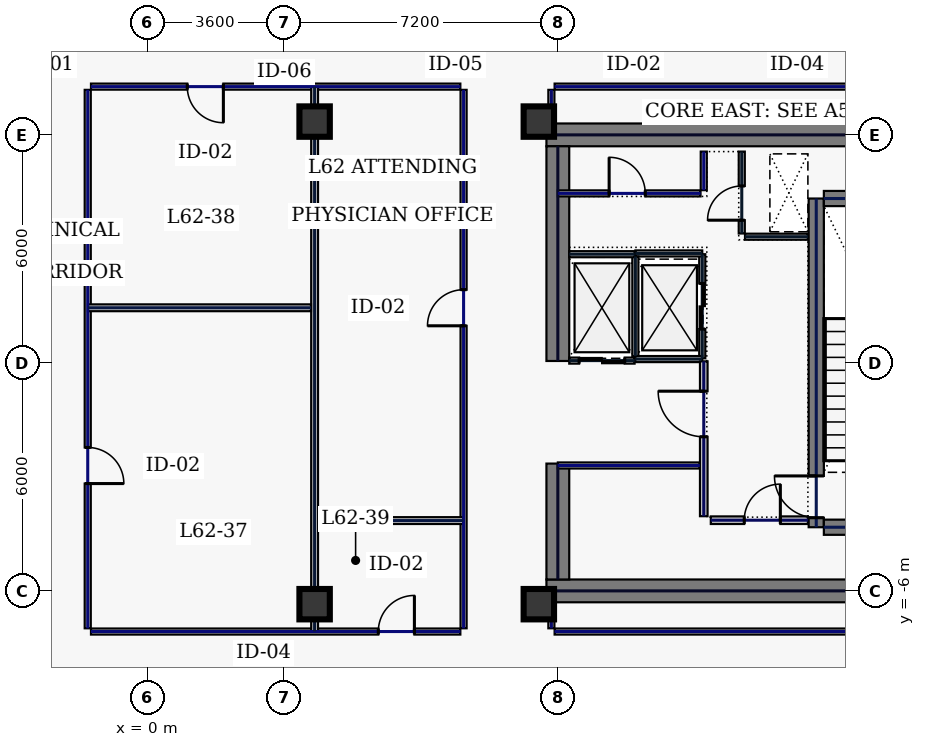
"""IFC4 building model, lengths in metres.
Left out: names, types, materials, properties, quantities, classifications, styles, units other than length and angle.
Written with IfcOpenShell. Run it as: python <this file> out.ifc"""

import sys

from ifc_helpers import new_model, si_unit, direction, frame, frame_2d, origin, origin_2d, place, context, subcontext, project, spatial, rectangle, hollow_rectangle, extrude, element, fill, save


model = new_model("IFC4")
c1 = context("Model", 3, precision=1e-05, world=origin(), true_north=direction((0.0, 1.0)))
c2 = subcontext(c1, "Body", "Model", "MODEL_VIEW")
j1 = project(units=[si_unit("LENGTHUNIT", "METRE"), si_unit("PLANEANGLEUNIT", "RADIAN")], contexts=[c1])
p1 = place(None, origin())
s1 = spatial("IfcSite", under=j1, at=p1, CompositionType="ELEMENT")
p2 = place(p1, origin())
s2 = spatial("IfcBuilding", under=s1, at=p2, CompositionType="ELEMENT")
p3 = place(p2, frame((0.0, 0.0, 267.0)))
s3 = spatial("IfcBuildingStorey", under=s2, at=p3, CompositionType="ELEMENT", Elevation=267.0)
for number, where, z_axis, x_axis in (
    (1, (10.5, 6.0, 0.0), (0.0, 0.0, 1.0), (1.0, 0.0, 0.0)),
    (2, (10.5, -6.0, 0.0), (0.0, 0.0, 1.0), (1.0, 0.0, 0.0)),
):
    element("IfcWall", number, at=place(p3, frame(where, z_axis=z_axis, x_axis=x_axis)), inside=s3, PredefinedType="SHEAR", context=c2, shape_type="SweptSolid", body=[
        extrude(rectangle(XDim=11.5, YDim=0.6, at=frame_2d((5.75, 0.0))), origin(), (0.0, 0.0, 1.0), 3.68),
    ])
p4 = place(p3, frame((10.8, -5.7, 0.0), z_axis=(0.0, 0.0, 1.0), x_axis=(0.0, 1.0, 0.0)))
e3 = element("IfcWall", 3, at=p4, inside=s3, PredefinedType="SHEAR", context=c2, shape_type="SweptSolid", body=[
    extrude(rectangle(XDim=3.05, YDim=0.6, at=frame_2d((1.525, 0.0))), origin(), (0.0, 0.0, 1.0), 3.68),
])
p5 = place(p3, frame((10.8, 0.05, 0.0), z_axis=(0.0, 0.0, 1.0), x_axis=(0.0, 1.0, 0.0)))
e4 = element("IfcWall", 4, at=p5, inside=s3, PredefinedType="SHEAR", context=c2, shape_type="SweptSolid", body=[
    extrude(rectangle(XDim=5.65, YDim=0.6, at=frame_2d((2.825, 0.0))), origin(), (0.0, 0.0, 1.0), 3.68),
])
p6 = place(p3, frame((17.6, -4.325, 0.0), z_axis=(0.0, 0.0, 1.0), x_axis=(0.0, 1.0, 0.0)))
e5 = element("IfcWall", 5, at=p6, inside=s3, PredefinedType="SHEAR", context=c2, shape_type="SweptSolid", body=[
    extrude(rectangle(XDim=8.65, YDim=0.4, at=frame_2d((4.325, 0.0))), origin(), (0.0, 0.0, 1.0), 3.68),
])
p7 = place(p6, frame((0.25, 0.0, 0.0)))
e6 = element("IfcOpeningElement", 6, at=p7, cuts=e5, PredefinedType="OPENING", context=c2, shape_type="SweptSolid", body=[
    extrude(rectangle(XDim=1.1, YDim=2.2, at=frame_2d((0.55, 1.1))), frame((0.0, 0.21, 0.0), z_axis=(0.0, -1.0, 0.0), x_axis=(1.0, 0.0, 0.0)), (0.0, 0.0, 1.0), 0.42),
])
for number, where, z_axis, x_axis in (
    (7, (17.8, -4.325, 0.0), (0.0, 0.0, 1.0), (1.0, 0.0, 0.0)),
    (8, (17.8, 4.325, 0.0), (0.0, 0.0, 1.0), (1.0, 0.0, 0.0)),
):
    element("IfcWall", number, at=place(p3, frame(where, z_axis=z_axis, x_axis=x_axis)), inside=s3, PredefinedType="SHEAR", context=c2, shape_type="SweptSolid", body=[
        extrude(rectangle(XDim=3.4, YDim=0.4, at=frame_2d((1.7, 0.0))), origin(), (0.0, 0.0, 1.0), 3.68),
    ])
for number, where, z_axis, x_axis in (
    (9, (10.3, -6.35, 0.0), (0.0, 0.0, 1.0), (1.0, 0.0, 0.0)),
    (10, (10.3, 6.35, 0.0), (0.0, 0.0, 1.0), (1.0, 0.0, 0.0)),
    (11, (4.4, -6.35, 0.0), (0.0, 0.0, 1.0), (1.0, 0.0, 0.0)),
    (12, (4.4, 6.35, 0.0), (0.0, 0.0, 1.0), (1.0, 0.0, 0.0)),
):
    element("IfcColumn", number, at=place(p3, frame(where, z_axis=z_axis, x_axis=x_axis)), inside=s3, PredefinedType="COLUMN", context=c2, shape_type="SweptSolid", body=[
        extrude(hollow_rectangle(XDim=0.8, YDim=0.8, WallThickness=0.036, at=origin_2d()), origin(), (0.0, 0.0, 1.0), 3.68),
    ])
p8 = place(p3, frame((14.6, 0.12, 0.0), z_axis=(0.0, 0.0, 1.0), x_axis=(0.0, 1.0, 0.0)))
e13 = element("IfcWall", 13, at=p8, inside=s3, PredefinedType="PARTITIONING", context=c2, shape_type="SweptSolid", body=[
    extrude(rectangle(XDim=2.74, YDim=0.16, at=frame_2d((1.37, 0.0))), origin(), (0.0, 0.0, 1.0), 3.68),
])
p9 = place(p8, frame((0.77, 0.0, 0.0)))
e14 = element("IfcOpeningElement", 14, at=p9, cuts=e13, PredefinedType="OPENING", context=c2, shape_type="SweptSolid", body=[
    extrude(rectangle(XDim=1.2, YDim=2.2, at=frame_2d((0.6, 1.1))), frame((0.0, 0.09, 0.0), z_axis=(0.0, -1.0, 0.0), x_axis=(1.0, 0.0, 0.0)), (0.0, 0.0, 1.0), 0.18),
])
for number, where, z_axis, x_axis in (
    (15, (12.84, 0.1, 0.0), (0.0, 0.0, 1.0), (1.0, 0.0, 0.0)),
    (16, (12.84, 2.88, 0.0), (0.0, 0.0, 1.0), (1.0, 0.0, 0.0)),
):
    element("IfcWall", number, at=place(p3, frame(where, z_axis=z_axis, x_axis=x_axis)), inside=s3, PredefinedType="PARTITIONING", context=c2, shape_type="SweptSolid", body=[
        extrude(rectangle(XDim=1.76, YDim=0.16, at=frame_2d((0.88, 0.0))), origin(), (0.0, 0.0, 1.0), 3.68),
    ])
p10 = place(p3, frame((12.84, 0.18, 0.0), z_axis=(0.0, 0.0, 1.0), x_axis=(0.0, 1.0, 0.0)))
e17 = element("IfcWall", 17, at=p10, inside=s3, PredefinedType="PARTITIONING", context=c2, shape_type="SweptSolid", body=[
    extrude(rectangle(XDim=2.62, YDim=0.16, at=frame_2d((1.31, 0.0))), origin(), (0.0, 0.0, 1.0), 3.68),
])
p11 = place(p3, frame((11.1, 0.06, 0.0), z_axis=(0.0, 0.0, 1.0), x_axis=(1.0, 0.0, 0.0)))
e18 = element("IfcWall", 18, at=p11, inside=s3, PredefinedType="PARTITIONING", context=c2, shape_type="SweptSolid", body=[
    extrude(rectangle(XDim=1.72, YDim=0.16, at=frame_2d((0.86, 0.0))), origin(), (0.0, 0.0, 1.0), 3.68),
])
p12 = place(p11, frame((0.26, 0.0, 0.0)))
e19 = element("IfcOpeningElement", 19, at=p12, cuts=e18, PredefinedType="OPENING", context=c2, shape_type="SweptSolid", body=[
    extrude(rectangle(XDim=1.2, YDim=2.2, at=frame_2d((0.6, 1.1))), frame((0.0, 0.09, 0.0), z_axis=(0.0, -1.0, 0.0), x_axis=(1.0, 0.0, 0.0)), (0.0, 0.0, 1.0), 0.18),
])
p13 = place(p3, frame((11.1, 2.86, 0.0), z_axis=(0.0, 0.0, 1.0), x_axis=(1.0, 0.0, 0.0)))
e20 = element("IfcWall", 20, at=p13, inside=s3, PredefinedType="PARTITIONING", context=c2, shape_type="SweptSolid", body=[
    extrude(rectangle(XDim=1.72, YDim=0.16, at=frame_2d((0.86, 0.0))), origin(), (0.0, 0.0, 1.0), 3.68),
])
p14 = place(p3, frame((15.64, 3.405, 0.0), z_axis=(0.0, 0.0, 1.0), x_axis=(0.0, 1.0, 0.0)))
e21 = element("IfcWall", 21, at=p14, inside=s3, PredefinedType="PARTITIONING", context=c2, shape_type="SweptSolid", body=[
    extrude(rectangle(XDim=2.155, YDim=0.16, at=frame_2d((1.078, 0.0))), origin(), (0.0, 0.0, 1.0), 3.68),
])
p15 = place(p14, frame((0.35, 0.0, 0.0)))
e22 = element("IfcOpeningElement", 22, at=p15, cuts=e21, PredefinedType="OPENING", context=c2, shape_type="SweptSolid", body=[
    extrude(rectangle(XDim=0.9, YDim=2.2, at=frame_2d((0.45, 1.1))), frame((0.0, 0.09, 0.0), z_axis=(0.0, -1.0, 0.0), x_axis=(1.0, 0.0, 0.0)), (0.0, 0.0, 1.0), 0.18),
])
p16 = place(p3, frame((15.725, 3.32, 0.0), z_axis=(0.0, 0.0, 1.0), x_axis=(1.0, 0.0, 0.0)))
e23 = element("IfcWall", 23, at=p16, inside=s3, PredefinedType="PARTITIONING", context=c2, shape_type="SweptSolid", body=[
    extrude(rectangle(XDim=1.655, YDim=0.16, at=frame_2d((0.827, 0.0))), origin(), (0.0, 0.0, 1.0), 3.68),
])
p17 = place(p3, frame((14.825, -4.14, 0.0), z_axis=(0.0, 0.0, 1.0), x_axis=(1.0, 0.0, 0.0)))
e24 = element("IfcWall", 24, at=p17, inside=s3, PredefinedType="SOLIDWALL", context=c2, shape_type="SweptSolid", body=[
    extrude(rectangle(XDim=2.555, YDim=0.2, at=frame_2d((1.277, 0.0))), origin(), (0.0, 0.0, 1.0), 3.68),
])
p18 = place(p17, frame((0.88, 0.0, 0.0)))
e25 = element("IfcOpeningElement", 25, at=p18, cuts=e24, PredefinedType="OPENING", context=c2, shape_type="SweptSolid", body=[
    extrude(rectangle(XDim=0.95, YDim=2.2, at=frame_2d((0.475, 1.1))), frame((0.0, 0.11, 0.0), z_axis=(0.0, -1.0, 0.0), x_axis=(1.0, 0.0, 0.0)), (0.0, 0.0, 1.0), 0.22),
])
p19 = place(p3, frame((10.8, -2.7, 0.0), z_axis=(0.0, 0.0, 1.0), x_axis=(1.0, 0.0, 0.0)))
e26 = element("IfcWall", 26, at=p19, inside=s3, PredefinedType="PARTITIONING", context=c2, shape_type="SweptSolid", body=[
    extrude(rectangle(XDim=3.735, YDim=0.16, at=frame_2d((1.867, 0.0))), origin(), (0.0, 0.0, 1.0), 3.68),
])
p20 = place(p3, frame((10.8, 4.46, 0.0), z_axis=(0.0, 0.0, 1.0), x_axis=(1.0, 0.0, 0.0)))
e27 = element("IfcWall", 27, at=p20, inside=s3, PredefinedType="PARTITIONING", context=c2, shape_type="SweptSolid", body=[
    extrude(rectangle(XDim=3.755, YDim=0.16, at=frame_2d((1.877, 0.0))), origin(), (0.0, 0.0, 1.0), 3.68),
])
p21 = place(p20, frame((1.35, 0.0, 0.0)))
e28 = element("IfcOpeningElement", 28, at=p21, cuts=e27, PredefinedType="OPENING", context=c2, shape_type="SweptSolid", body=[
    extrude(rectangle(XDim=0.95, YDim=2.2, at=frame_2d((0.475, 1.1))), frame((0.0, 0.09, 0.0), z_axis=(0.0, -1.0, 0.0), x_axis=(1.0, 0.0, 0.0)), (0.0, 0.0, 1.0), 0.18),
])
p22 = place(p3, frame((14.64, 4.545, 0.0), z_axis=(0.0, 0.0, 1.0), x_axis=(0.0, 1.0, 0.0)))
e29 = element("IfcWall", 29, at=p22, inside=s3, PredefinedType="PARTITIONING", context=c2, shape_type="SweptSolid", body=[
    extrude(rectangle(XDim=1.015, YDim=0.16, at=frame_2d((0.508, 0.0))), origin(), (0.0, 0.0, 1.0), 3.68),
])
p23 = place(p3, frame((14.64, -4.035, 0.0), z_axis=(0.0, 0.0, 1.0), x_axis=(0.0, 1.0, 0.0)))
e30 = element("IfcWall", 30, at=p23, inside=s3, PredefinedType="SOLIDWALL", context=c2, shape_type="SweptSolid", body=[
    extrude(rectangle(XDim=4.075, YDim=0.2, at=frame_2d((2.038, 0.0))), origin(), (0.0, 0.0, 1.0), 3.68),
])
p24 = place(p23, frame((2.09, 0.0, 0.0)))
e31 = element("IfcOpeningElement", 31, at=p24, cuts=e30, PredefinedType="OPENING", context=c2, shape_type="SweptSolid", body=[
    extrude(rectangle(XDim=1.2, YDim=2.2, at=frame_2d((0.6, 1.1))), frame((0.0, 0.11, 0.0), z_axis=(0.0, -1.0, 0.0), x_axis=(1.0, 0.0, 0.0)), (0.0, 0.0, 1.0), 0.22),
])
p25 = place(p3, frame((22.585, 7.27, 0.0), z_axis=(0.0, 0.0, 1.0), x_axis=(-1.0, 0.0, 0.0)))
e32 = element("IfcWall", 32, at=p25, inside=s3, PredefinedType="PARTITIONING", context=c2, shape_type="SweptSolid", body=[
    extrude(rectangle(XDim=11.87, YDim=0.16, at=frame_2d((5.935, 0.0))), origin(), (0.0, 0.0, 1.0), 3.68),
])
p26 = place(p3, frame((10.63, 7.185, 0.0), z_axis=(0.0, 0.0, 1.0), x_axis=(0.0, -1.0, 0.0)))
e33 = element("IfcWall", 33, at=p26, inside=s3, PredefinedType="PARTITIONING", context=c2, shape_type="SweptSolid", body=[
    extrude(rectangle(XDim=0.765, YDim=0.16, at=frame_2d((0.383, 0.0))), origin(), (0.0, 0.0, 1.0), 1.475),
])
p27 = place(p3, frame((10.63, -6.42, 0.0), z_axis=(0.0, 0.0, 1.0), x_axis=(0.0, -1.0, 0.0)))
e34 = element("IfcWall", 34, at=p27, inside=s3, PredefinedType="PARTITIONING", context=c2, shape_type="SweptSolid", body=[
    extrude(rectangle(XDim=0.565, YDim=0.16, at=frame_2d((0.283, 0.0))), origin(), (0.0, 0.0, 1.0), 1.475),
])
p28 = place(p3, frame((10.715, -7.07, 0.0), z_axis=(0.0, 0.0, 1.0), x_axis=(1.0, 0.0, 0.0)))
e35 = element("IfcWall", 35, at=p28, inside=s3, PredefinedType="PARTITIONING", context=c2, shape_type="SweptSolid", body=[
    extrude(rectangle(XDim=11.87, YDim=0.16, at=frame_2d((5.935, 0.0))), origin(), (0.0, 0.0, 1.0), 3.68),
])
p29 = place(p3, frame((8.235, 7.27, 0.0), z_axis=(0.0, 0.0, 1.0), x_axis=(-1.0, 0.0, 0.0)))
e36 = element("IfcWall", 36, at=p29, inside=s3, PredefinedType="PARTITIONING", context=c2, shape_type="SweptSolid", body=[
    extrude(rectangle(XDim=9.72, YDim=0.16, at=frame_2d((4.86, 0.0))), origin(), (0.0, 0.0, 1.0), 3.68),
])
p30 = place(p29, frame((6.236, 0.0, 0.0)))
e37 = element("IfcOpeningElement", 37, at=p30, cuts=e36, PredefinedType="OPENING", context=c2, shape_type="SweptSolid", body=[
    extrude(rectangle(XDim=0.95, YDim=2.2, at=frame_2d((0.475, 1.1))), frame((0.0, 0.09, 0.0), z_axis=(0.0, -1.0, 0.0), x_axis=(1.0, 0.0, 0.0)), (0.0, 0.0, 1.0), 0.18),
])
p31 = place(p3, frame((-1.57, 7.185, 0.0), z_axis=(0.0, 0.0, 1.0), x_axis=(0.0, -1.0, 0.0)))
e38 = element("IfcWall", 38, at=p31, inside=s3, PredefinedType="PARTITIONING", context=c2, shape_type="SweptSolid", body=[
    extrude(rectangle(XDim=14.17, YDim=0.16, at=frame_2d((7.085, 0.0))), origin(), (0.0, 0.0, 1.0), 3.68),
])
p32 = place(p31, frame((9.411, 0.0, 0.0)))
e39 = element("IfcOpeningElement", 39, at=p32, cuts=e38, PredefinedType="OPENING", context=c2, shape_type="SweptSolid", body=[
    extrude(rectangle(XDim=0.95, YDim=2.2, at=frame_2d((0.475, 1.1))), frame((0.0, 0.09, 0.0), z_axis=(0.0, -1.0, 0.0), x_axis=(1.0, 0.0, 0.0)), (0.0, 0.0, 1.0), 0.18),
])
p33 = place(p3, frame((-1.485, -7.07, 0.0), z_axis=(0.0, 0.0, 1.0), x_axis=(1.0, 0.0, 0.0)))
e40 = element("IfcWall", 40, at=p33, inside=s3, PredefinedType="PARTITIONING", context=c2, shape_type="SweptSolid", body=[
    extrude(rectangle(XDim=9.72, YDim=0.16, at=frame_2d((4.86, 0.0))), origin(), (0.0, 0.0, 1.0), 3.68),
])
p34 = place(p33, frame((7.561, 0.0, 0.0)))
e41 = element("IfcOpeningElement", 41, at=p34, cuts=e40, PredefinedType="OPENING", context=c2, shape_type="SweptSolid", body=[
    extrude(rectangle(XDim=0.95, YDim=2.2, at=frame_2d((0.475, 1.1))), frame((0.0, 0.09, 0.0), z_axis=(0.0, -1.0, 0.0), x_axis=(1.0, 0.0, 0.0)), (0.0, 0.0, 1.0), 0.18),
])
p35 = place(p3, frame((8.32, -6.985, 0.0), z_axis=(0.0, 0.0, 1.0), x_axis=(0.0, 1.0, 0.0)))
e42 = element("IfcWall", 42, at=p35, inside=s3, PredefinedType="PARTITIONING", context=c2, shape_type="SweptSolid", body=[
    extrude(rectangle(XDim=14.17, YDim=0.16, at=frame_2d((7.085, 0.0))), origin(), (0.0, 0.0, 1.0), 3.68),
])
p36 = place(p35, frame((7.961, 0.0, 0.0)))
e43 = element("IfcOpeningElement", 43, at=p36, cuts=e42, PredefinedType="OPENING", context=c2, shape_type="SweptSolid", body=[
    extrude(rectangle(XDim=0.95, YDim=2.2, at=frame_2d((0.475, 1.1))), frame((0.0, 0.09, 0.0), z_axis=(0.0, -1.0, 0.0), x_axis=(1.0, 0.0, 0.0)), (0.0, 0.0, 1.0), 0.18),
])
p37 = place(p3, frame((4.4, -7.065, 0.0), z_axis=(0.0, 0.0, 1.0), x_axis=(0.0, 1.0, 0.0)))
e44 = element("IfcWall", 44, at=p37, inside=s3, PredefinedType="PARTITIONING", context=c2, shape_type="SweptSolid", body=[
    extrude(rectangle(XDim=14.33, YDim=0.18, at=frame_2d((7.165, 0.0))), origin(), (0.0, 0.0, 1.0), 1.475),
])
p38 = place(p3, frame((-1.565, 1.45, 0.0), z_axis=(0.0, 0.0, 1.0), x_axis=(1.0, 0.0, 0.0)))
e45 = element("IfcWall", 45, at=p38, inside=s3, PredefinedType="PARTITIONING", context=c2, shape_type="SweptSolid", body=[
    extrude(rectangle(XDim=5.87, YDim=0.18, at=frame_2d((2.935, 0.0))), origin(), (0.0, 0.0, 1.0), 3.68),
])
p39 = place(p3, frame((4.495, -4.15, 0.0), z_axis=(0.0, 0.0, 1.0), x_axis=(1.0, 0.0, 0.0)))
e46 = element("IfcWall", 46, at=p39, inside=s3, PredefinedType="PARTITIONING", context=c2, shape_type="SweptSolid", body=[
    extrude(rectangle(XDim=3.82, YDim=0.18, at=frame_2d((1.91, 0.0))), origin(), (0.0, 0.0, 1.0), 3.68),
])
p40 = place(p7, origin())
e47 = element("IfcDoor", 47, at=p40, inside=s3, OperationType="SINGLE_SWING_RIGHT", PredefinedType="DOOR", context=c2, shape_type="SweptSolid", body=[
    extrude(rectangle(XDim=1.1, YDim=2.2, at=frame_2d((0.55, 1.1))), frame((0.0, 0.025, 0.0), z_axis=(0.0, -1.0, 0.0), x_axis=(1.0, 0.0, 0.0)), (0.0, 0.0, 1.0), 0.05),
])
fill(e6, e47)
p41 = place(p9, origin())
e48 = element("IfcDoor", 48, at=p41, inside=s3, OperationType="SLIDING_TO_LEFT", PredefinedType="DOOR", context=c2, shape_type="SweptSolid", body=[
    extrude(rectangle(XDim=1.2, YDim=2.2, at=frame_2d((0.6, 1.1))), frame((0.0, 0.025, 0.0), z_axis=(0.0, -1.0, 0.0), x_axis=(1.0, 0.0, 0.0)), (0.0, 0.0, 1.0), 0.05),
])
fill(e14, e48)
p42 = place(p12, origin())
e49 = element("IfcDoor", 49, at=p42, inside=s3, OperationType="SLIDING_TO_LEFT", PredefinedType="DOOR", context=c2, shape_type="SweptSolid", body=[
    extrude(rectangle(XDim=1.2, YDim=2.2, at=frame_2d((0.6, 1.1))), frame((0.0, 0.025, 0.0), z_axis=(0.0, -1.0, 0.0), x_axis=(1.0, 0.0, 0.0)), (0.0, 0.0, 1.0), 0.05),
])
fill(e19, e49)
p43 = place(p15, origin())
e50 = element("IfcDoor", 50, at=p43, inside=s3, OperationType="SINGLE_SWING_LEFT", PredefinedType="DOOR", context=c2, shape_type="SweptSolid", body=[
    extrude(rectangle(XDim=0.9, YDim=2.2, at=frame_2d((0.45, 1.1))), frame((0.0, 0.025, 0.0), z_axis=(0.0, -1.0, 0.0), x_axis=(1.0, 0.0, 0.0)), (0.0, 0.0, 1.0), 0.05),
])
fill(e22, e50)
p44 = place(p18, origin())
e51 = element("IfcDoor", 51, at=p44, inside=s3, OperationType="SINGLE_SWING_RIGHT", PredefinedType="DOOR", context=c2, shape_type="SweptSolid", body=[
    extrude(rectangle(XDim=0.95, YDim=2.2, at=frame_2d((0.475, 1.1))), frame((0.0, 0.025, 0.0), z_axis=(0.0, -1.0, 0.0), x_axis=(1.0, 0.0, 0.0)), (0.0, 0.0, 1.0), 0.05),
])
fill(e25, e51)
p45 = place(p21, origin())
e52 = element("IfcDoor", 52, at=p45, inside=s3, OperationType="SINGLE_SWING_LEFT", PredefinedType="DOOR", context=c2, shape_type="SweptSolid", body=[
    extrude(rectangle(XDim=0.95, YDim=2.2, at=frame_2d((0.475, 1.1))), frame((0.0, 0.025, 0.0), z_axis=(0.0, -1.0, 0.0), x_axis=(1.0, 0.0, 0.0)), (0.0, 0.0, 1.0), 0.05),
])
fill(e28, e52)
p46 = place(p24, origin())
e53 = element("IfcDoor", 53, at=p46, inside=s3, OperationType="SINGLE_SWING_RIGHT", PredefinedType="DOOR", context=c2, shape_type="SweptSolid", body=[
    extrude(rectangle(XDim=1.2, YDim=2.2, at=frame_2d((0.6, 1.1))), frame((0.0, 0.025, 0.0), z_axis=(0.0, -1.0, 0.0), x_axis=(1.0, 0.0, 0.0)), (0.0, 0.0, 1.0), 0.05),
])
fill(e31, e53)
p47 = place(p32, origin())
e54 = element("IfcDoor", 54, at=p47, inside=s3, OperationType="SINGLE_SWING_RIGHT", PredefinedType="DOOR", context=c2, shape_type="SweptSolid", body=[
    extrude(rectangle(XDim=0.95, YDim=2.2, at=frame_2d((0.475, 1.1))), frame((0.0, 0.025, 0.0), z_axis=(0.0, -1.0, 0.0), x_axis=(1.0, 0.0, 0.0)), (0.0, 0.0, 1.0), 0.05),
])
fill(e39, e54)
p48 = place(p30, origin())
e55 = element("IfcDoor", 55, at=p48, inside=s3, OperationType="SINGLE_SWING_LEFT", PredefinedType="DOOR", context=c2, shape_type="SweptSolid", body=[
    extrude(rectangle(XDim=0.95, YDim=2.2, at=frame_2d((0.475, 1.1))), frame((0.0, 0.025, 0.0), z_axis=(0.0, -1.0, 0.0), x_axis=(1.0, 0.0, 0.0)), (0.0, 0.0, 1.0), 0.05),
])
fill(e37, e55)
p49 = place(p34, origin())
e56 = element("IfcDoor", 56, at=p49, inside=s3, OperationType="SINGLE_SWING_RIGHT", PredefinedType="DOOR", context=c2, shape_type="SweptSolid", body=[
    extrude(rectangle(XDim=0.95, YDim=2.2, at=frame_2d((0.475, 1.1))), frame((0.0, 0.025, 0.0), z_axis=(0.0, -1.0, 0.0), x_axis=(1.0, 0.0, 0.0)), (0.0, 0.0, 1.0), 0.05),
])
fill(e41, e56)
p50 = place(p36, origin())
e57 = element("IfcDoor", 57, at=p50, inside=s3, OperationType="SINGLE_SWING_LEFT", PredefinedType="DOOR", context=c2, shape_type="SweptSolid", body=[
    extrude(rectangle(XDim=0.95, YDim=2.2, at=frame_2d((0.475, 1.1))), frame((0.0, 0.025, 0.0), z_axis=(0.0, -1.0, 0.0), x_axis=(1.0, 0.0, 0.0)), (0.0, 0.0, 1.0), 0.05),
])
fill(e43, e57)
save(model, sys.argv[1])
